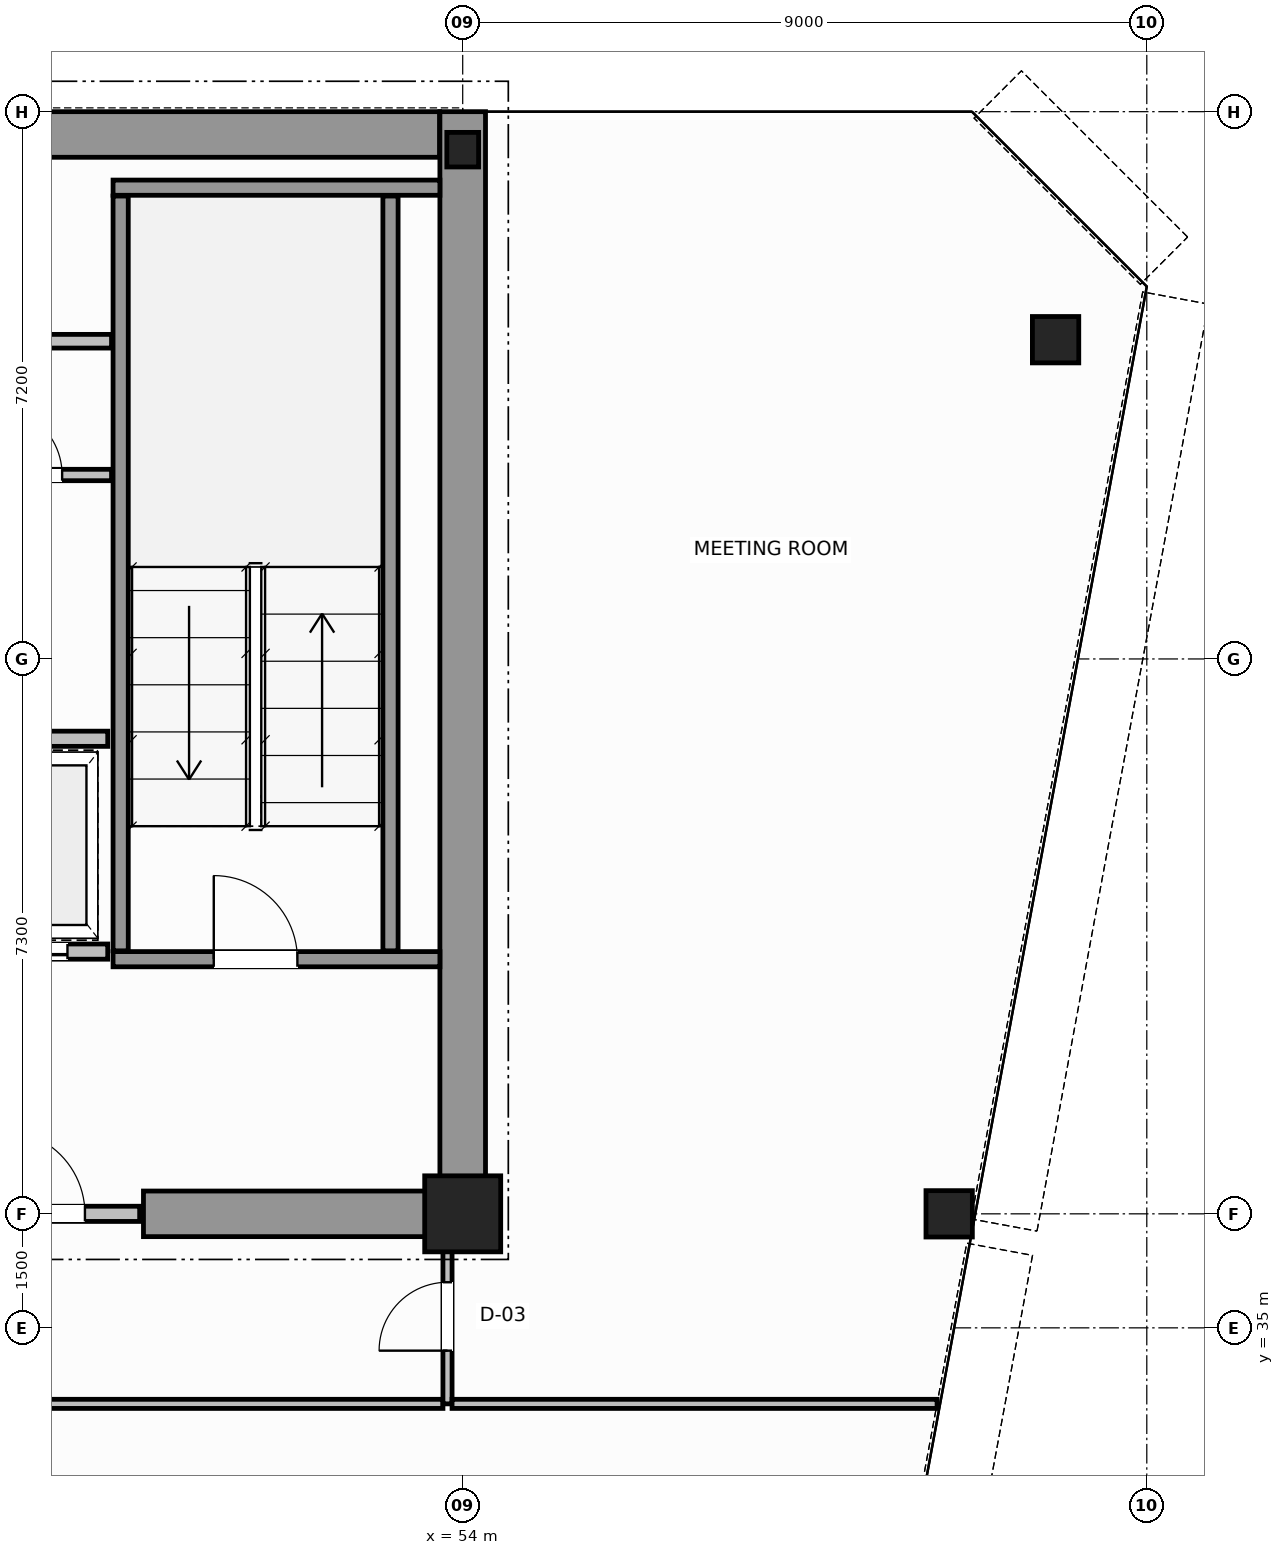
"""IFC4 building model, lengths in metres.
Left out: names, types, materials, properties, quantities, classifications, styles, units other than length and angle.
Written with IfcOpenShell. Run it as: python <this file> out.ifc"""

import sys

from ifc_helpers import new_model, si_unit, direction, frame, frame_2d, origin, origin_2d, place, context, subcontext, project, spatial, rectangle, hollow_circle, i_section, extrude, source, transform, mapped, element, fill, save


model = new_model("IFC4")
c1 = context("Model", 3, precision=1e-05, world=origin(), true_north=direction((0.0, 1.0)))
c2 = subcontext(c1, "Body", "Model", "MODEL_VIEW")
j1 = project(units=[si_unit("LENGTHUNIT", "METRE"), si_unit("PLANEANGLEUNIT", "RADIAN")], contexts=[c1])
p1 = place(None, origin())
s1 = spatial("IfcSite", under=j1, at=p1, CompositionType="ELEMENT")
p2 = place(p1, origin())
s2 = spatial("IfcBuilding", under=s1, at=p2, CompositionType="ELEMENT")
p3 = place(p2, frame((0.0, 0.0, 227.0)))
s3 = spatial("IfcBuildingStorey", under=s2, at=p3, CompositionType="ELEMENT", Elevation=227.0)
m1 = source(origin(), c2, "Body", "SweptSolid", [
    extrude(rectangle(XDim=1.0, YDim=1.0, at=origin_2d()), origin(), (0.0, 0.0, 1.0), 3.8),
])
p4 = place(p3, frame((54.0, 36.5, 0.0), z_axis=(0.0, 0.0, 1.0), x_axis=(1.0, 0.0, 0.0)))
e1 = element("IfcColumn", 1, at=p4, inside=s3, PredefinedType="COLUMN", context=c2, shape_type="MappedRepresentation", body=[
    mapped(m1, transform((0.0, 0.0, 0.0), scale=1.0)),
])
m2 = source(origin(), c2, "Body", "SweptSolid", [
    extrude(i_section(OverallWidth=0.418, OverallDepth=0.455, WebThickness=0.042, FlangeThickness=0.058, FilletRadius=0.015, at=origin_2d()), origin(), (0.0, 0.0, 1.0), 3.8),
])
p5 = place(p3, frame((54.0, 50.5, 0.0), z_axis=(0.0, 0.0, 1.0), x_axis=(1.0, 0.0, 0.0)))
e2 = element("IfcColumn", 2, at=p5, inside=s3, PredefinedType="COLUMN", context=c2, shape_type="MappedRepresentation", body=[
    mapped(m2, transform((0.0, 0.0, 0.0), scale=1.0)),
])
m3 = source(origin(), c2, "Body", "SweptSolid", [
    extrude(hollow_circle(Radius=0.305, WallThickness=0.03, at=origin_2d()), origin(), (0.0, 0.0, 1.0), 3.8),
])
for number, where, z_axis, x_axis in (
    (3, (61.8, 48.0, 0.0), (0.0, 0.0, 1.0), (1.0, 0.0, 0.0)),
    (4, (60.4, 36.5, 0.0), (0.0, 0.0, 1.0), (1.0, 0.0, 0.0)),
):
    element("IfcColumn", number, at=place(p3, frame(where, z_axis=z_axis, x_axis=x_axis)), inside=s3, PredefinedType="COLUMN", context=c2, shape_type="MappedRepresentation", body=[
        mapped(m3, transform((0.0, 0.0, 0.0), scale=1.0)),
    ])
p6 = place(p3, frame((34.002, 50.7, 0.0), z_axis=(0.0, 0.0, 1.0), x_axis=(1.0, 0.0, 0.0)))
e5 = element("IfcWall", 5, at=p6, inside=s3, PredefinedType="SHEAR", context=c2, shape_type="SweptSolid", body=[
    extrude(rectangle(XDim=19.694, YDim=0.6, at=frame_2d((9.847, 0.0))), origin(), (0.0, 0.0, 1.0), 3.8),
])
p7 = place(p3, frame((54.0, 36.5, 0.0), z_axis=(0.0, 0.0, 1.0), x_axis=(0.0, 1.0, 0.0)))
e6 = element("IfcWall", 6, at=p7, inside=s3, PredefinedType="SHEAR", context=c2, shape_type="SweptSolid", body=[
    extrude(rectangle(XDim=14.5, YDim=0.6, at=frame_2d((7.25, 0.0))), origin(), (0.0, 0.0, 1.0), 3.8),
])
p8 = place(p3, frame((49.8, 36.5, 0.0), z_axis=(0.0, 0.0, 1.0), x_axis=(1.0, 0.0, 0.0)))
e7 = element("IfcWall", 7, at=p8, inside=s3, PredefinedType="SHEAR", context=c2, shape_type="SweptSolid", body=[
    extrude(rectangle(XDim=3.88, YDim=0.6, at=frame_2d((1.94, 0.0))), origin(), (0.0, 0.0, 1.0), 2.58),
])
p9 = place(p3, frame((49.4, 39.85, 0.0), z_axis=(0.0, 0.0, 1.0), x_axis=(1.0, 0.0, 0.0)))
e8 = element("IfcWall", 8, at=p9, inside=s3, PredefinedType="SOLIDWALL", context=c2, shape_type="SweptSolid", body=[
    extrude(rectangle(XDim=4.3, YDim=0.2, at=frame_2d((2.15, 0.0))), origin(), (0.0, 0.0, 1.0), 3.8),
])
p10 = place(p9, frame((1.325, 0.0, 0.0)))
e9 = element("IfcOpeningElement", 9, at=p10, cuts=e8, PredefinedType="OPENING", context=c2, shape_type="SweptSolid", body=[
    extrude(rectangle(XDim=1.1, YDim=2.15, at=frame_2d((0.55, 1.075))), frame((0.0, 0.11, 0.0), z_axis=(0.0, -1.0, 0.0), x_axis=(1.0, 0.0, 0.0)), (0.0, 0.0, 1.0), 0.22),
])
p11 = place(p3, frame((49.4, 50.0, 0.0), z_axis=(0.0, 0.0, 1.0), x_axis=(1.0, 0.0, 0.0)))
e10 = element("IfcWall", 10, at=p11, inside=s3, PredefinedType="SOLIDWALL", context=c2, shape_type="SweptSolid", body=[
    extrude(rectangle(XDim=4.3, YDim=0.2, at=frame_2d((2.15, 0.0))), origin(), (0.0, 0.0, 1.0), 3.8),
])
for number, where, z_axis, x_axis in (
    (11, (49.5, 39.96, 0.0), (0.0, 0.0, 1.0), (0.0, 1.0, 0.0)),
    (12, (53.05, 39.96, 0.0), (0.0, 0.0, 1.0), (0.0, 1.0, 0.0)),
):
    element("IfcWall", number, at=place(p3, frame(where, z_axis=z_axis, x_axis=x_axis)), inside=s3, PredefinedType="SOLIDWALL", context=c2, shape_type="SweptSolid", body=[
        extrude(rectangle(XDim=9.93, YDim=0.2, at=frame_2d((4.965, 0.0))), origin(), (0.0, 0.0, 1.0), 3.8),
    ])
p12 = place(p3, frame((47.28, 36.5, 0.0), z_axis=(0.0, 0.0, 1.0), x_axis=(1.0, 0.0, 0.0)))
e13 = element("IfcWall", 13, at=p12, inside=s3, PredefinedType="SOLIDWALL", context=c2, shape_type="SweptSolid", body=[
    extrude(rectangle(XDim=2.47, YDim=0.2, at=frame_2d((1.235, 0.0))), origin(), (0.0, 0.0, 1.0), 2.57),
])
p13 = place(p12, frame((0.65, 0.0, 0.0)))
e14 = element("IfcOpeningElement", 14, at=p13, cuts=e13, PredefinedType="OPENING", context=c2, shape_type="SweptSolid", body=[
    extrude(rectangle(XDim=1.1, YDim=2.15, at=frame_2d((0.55, 1.075))), frame((0.0, 0.11, 0.0), z_axis=(0.0, -1.0, 0.0), x_axis=(1.0, 0.0, 0.0)), (0.0, 0.0, 1.0), 0.22),
])
p14 = place(p3, frame((47.17, 39.95, 0.0), z_axis=(0.0, 0.0, 1.0), x_axis=(1.0, 0.0, 0.0)))
e15 = element("IfcWall", 15, at=p14, inside=s3, PredefinedType="SOLIDWALL", context=c2, shape_type="SweptSolid", body=[
    extrude(rectangle(XDim=2.16, YDim=0.2, at=frame_2d((1.08, 0.0))), origin(), (0.0, 0.0, 1.0), 3.58),
])
p15 = place(p14, frame((0.53, 0.0, 0.0)))
e16 = element("IfcOpeningElement", 16, at=p15, cuts=e15, PredefinedType="OPENING", context=c2, shape_type="SweptSolid", body=[
    extrude(rectangle(XDim=1.1, YDim=2.15, at=frame_2d((0.55, 1.075))), frame((0.0, 0.11, 0.0), z_axis=(0.0, -1.0, 0.0), x_axis=(1.0, 0.0, 0.0)), (0.0, 0.0, 1.0), 0.22),
])
p16 = place(p3, frame((47.17, 42.75, 0.0), z_axis=(0.0, 0.0, 1.0), x_axis=(1.0, 0.0, 0.0)))
e17 = element("IfcWall", 17, at=p16, inside=s3, PredefinedType="SOLIDWALL", context=c2, shape_type="SweptSolid", body=[
    extrude(rectangle(XDim=2.16, YDim=0.2, at=frame_2d((1.08, 0.0))), origin(), (0.0, 0.0, 1.0), 3.58),
])
p17 = place(p3, frame((47.28, 46.22, 0.0), z_axis=(0.0, 0.0, 1.0), x_axis=(1.0, 0.0, 0.0)))
e18 = element("IfcWall", 18, at=p17, inside=s3, PredefinedType="PARTITIONING", context=c2, shape_type="SweptSolid", body=[
    extrude(rectangle(XDim=2.1, YDim=0.15, at=frame_2d((1.05, 0.0))), origin(), (0.0, 0.0, 1.0), 3.58),
])
p18 = place(p17, frame((0.55, 0.0, 0.0)))
e19 = element("IfcOpeningElement", 19, at=p18, cuts=e18, PredefinedType="OPENING", context=c2, shape_type="SweptSolid", body=[
    extrude(rectangle(XDim=0.9, YDim=2.1, at=frame_2d((0.45, 1.05))), frame((0.0, 0.085, 0.0), z_axis=(0.0, -1.0, 0.0), x_axis=(1.0, 0.0, 0.0)), (0.0, 0.0, 1.0), 0.17),
])
p19 = place(p3, frame((40.62, 47.98, 0.0), z_axis=(0.0, 0.0, 1.0), x_axis=(1.0, 0.0, 0.0)))
e20 = element("IfcWall", 20, at=p19, inside=s3, PredefinedType="PLUMBINGWALL", context=c2, shape_type="SweptSolid", body=[
    extrude(rectangle(XDim=8.76, YDim=0.18, at=frame_2d((4.38, 0.0))), origin(), (0.0, 0.0, 1.0), 3.58),
])
p20 = place(p19, frame((3.8, 0.0, 0.0)))
e21 = element("IfcOpeningElement", 21, at=p20, cuts=e20, PredefinedType="OPENING", context=c2, shape_type="SweptSolid", body=[
    extrude(rectangle(XDim=0.9, YDim=2.15, at=frame_2d((0.45, 1.075))), frame((0.0, 0.1, 0.0), z_axis=(0.0, -1.0, 0.0), x_axis=(1.0, 0.0, 0.0)), (0.0, 0.0, 1.0), 0.2),
])
p21 = place(p3, frame((33.26, 34.0, 0.0), z_axis=(0.0, 0.0, 1.0), x_axis=(1.0, 0.0, 0.0)))
e22 = element("IfcWall", 22, at=p21, inside=s3, PredefinedType="PARTITIONING", context=c2, shape_type="SweptSolid", body=[
    extrude(rectangle(XDim=20.48, YDim=0.12, at=frame_2d((10.24, 0.0))), origin(), (0.0, 0.0, 1.0), 3.58),
])
p22 = place(p3, frame((53.8, 34.0, 0.0), z_axis=(0.0, 0.0, 1.0), x_axis=(0.0, 1.0, 0.0)))
e23 = element("IfcWall", 23, at=p22, inside=s3, PredefinedType="PARTITIONING", context=c2, shape_type="SweptSolid", body=[
    extrude(rectangle(XDim=2.44, YDim=0.12, at=frame_2d((1.22, 0.0))), origin(), (0.0, 0.0, 1.0), 3.58),
])
p23 = place(p22, frame((0.7, 0.0, 0.0)))
e24 = element("IfcOpeningElement", 24, at=p23, cuts=e23, PredefinedType="OPENING", context=c2, shape_type="SweptSolid", body=[
    extrude(rectangle(XDim=0.9, YDim=2.15, at=frame_2d((0.45, 1.075))), frame((0.0, 0.07, 0.0), z_axis=(0.0, -1.0, 0.0), x_axis=(1.0, 0.0, 0.0)), (0.0, 0.0, 1.0), 0.14),
])
p24 = place(p3, frame((53.86, 34.0, 0.0), z_axis=(0.0, 0.0, 1.0), x_axis=(1.0, 0.0, 0.0)))
e25 = element("IfcWall", 25, at=p24, inside=s3, PredefinedType="PARTITIONING", context=c2, shape_type="SweptSolid", body=[
    extrude(rectangle(XDim=6.381, YDim=0.12, at=frame_2d((3.19, 0.0))), origin(), (0.0, 0.0, 1.0), 3.58),
])
m4 = source(origin(), c2, "Body", "SweptSolid", [
    extrude(rectangle(XDim=1.1, YDim=2.15, at=frame_2d((0.55, 1.075))), frame((0.0, 0.025, 0.0), z_axis=(0.0, -1.0, 0.0), x_axis=(1.0, 0.0, 0.0)), (0.0, 0.0, 1.0), 0.05),
])
p25 = place(p10, origin())
e26 = element("IfcDoor", 26, at=p25, inside=s3, OperationType="SINGLE_SWING_RIGHT", PredefinedType="DOOR", context=c2, shape_type="MappedRepresentation", body=[
    mapped(m4, transform((0.0, 0.0, 0.0), scale=1.0)),
])
fill(e9, e26)
p26 = place(p13, origin())
e27 = element("IfcDoor", 27, at=p26, inside=s3, OperationType="SINGLE_SWING_LEFT", PredefinedType="DOOR", context=c2, shape_type="MappedRepresentation", body=[
    mapped(m4, transform((0.0, 0.0, 0.0), scale=1.0)),
])
fill(e14, e27)
p27 = place(p15, origin())
e28 = element("IfcDoor", 28, at=p27, inside=s3, OperationType="DOUBLE_DOOR_SLIDING", PredefinedType="DOOR", context=c2, shape_type="MappedRepresentation", body=[
    mapped(m4, transform((0.0, 0.0, 0.0), scale=1.0)),
])
fill(e16, e28)
m5 = source(origin(), c2, "Body", "SweptSolid", [
    extrude(rectangle(XDim=0.9, YDim=2.1, at=frame_2d((0.45, 1.05))), frame((0.0, 0.025, 0.0), z_axis=(0.0, -1.0, 0.0), x_axis=(1.0, 0.0, 0.0)), (0.0, 0.0, 1.0), 0.05),
])
p28 = place(p18, origin())
e29 = element("IfcDoor", 29, at=p28, inside=s3, OperationType="SINGLE_SWING_RIGHT", PredefinedType="DOOR", context=c2, shape_type="MappedRepresentation", body=[
    mapped(m5, transform((0.0, 0.0, 0.0), scale=1.0)),
])
fill(e19, e29)
m6 = source(origin(), c2, "Body", "SweptSolid", [
    extrude(rectangle(XDim=0.9, YDim=2.15, at=frame_2d((0.45, 1.075))), frame((0.0, 0.025, 0.0), z_axis=(0.0, -1.0, 0.0), x_axis=(1.0, 0.0, 0.0)), (0.0, 0.0, 1.0), 0.05),
])
p29 = place(p23, origin())
e30 = element("IfcDoor", 30, at=p29, inside=s3, OperationType="SINGLE_SWING_RIGHT", PredefinedType="DOOR", context=c2, shape_type="MappedRepresentation", body=[
    mapped(m6, transform((0.0, 0.0, 0.0), scale=1.0)),
])
fill(e24, e30)
save(model, sys.argv[1])
